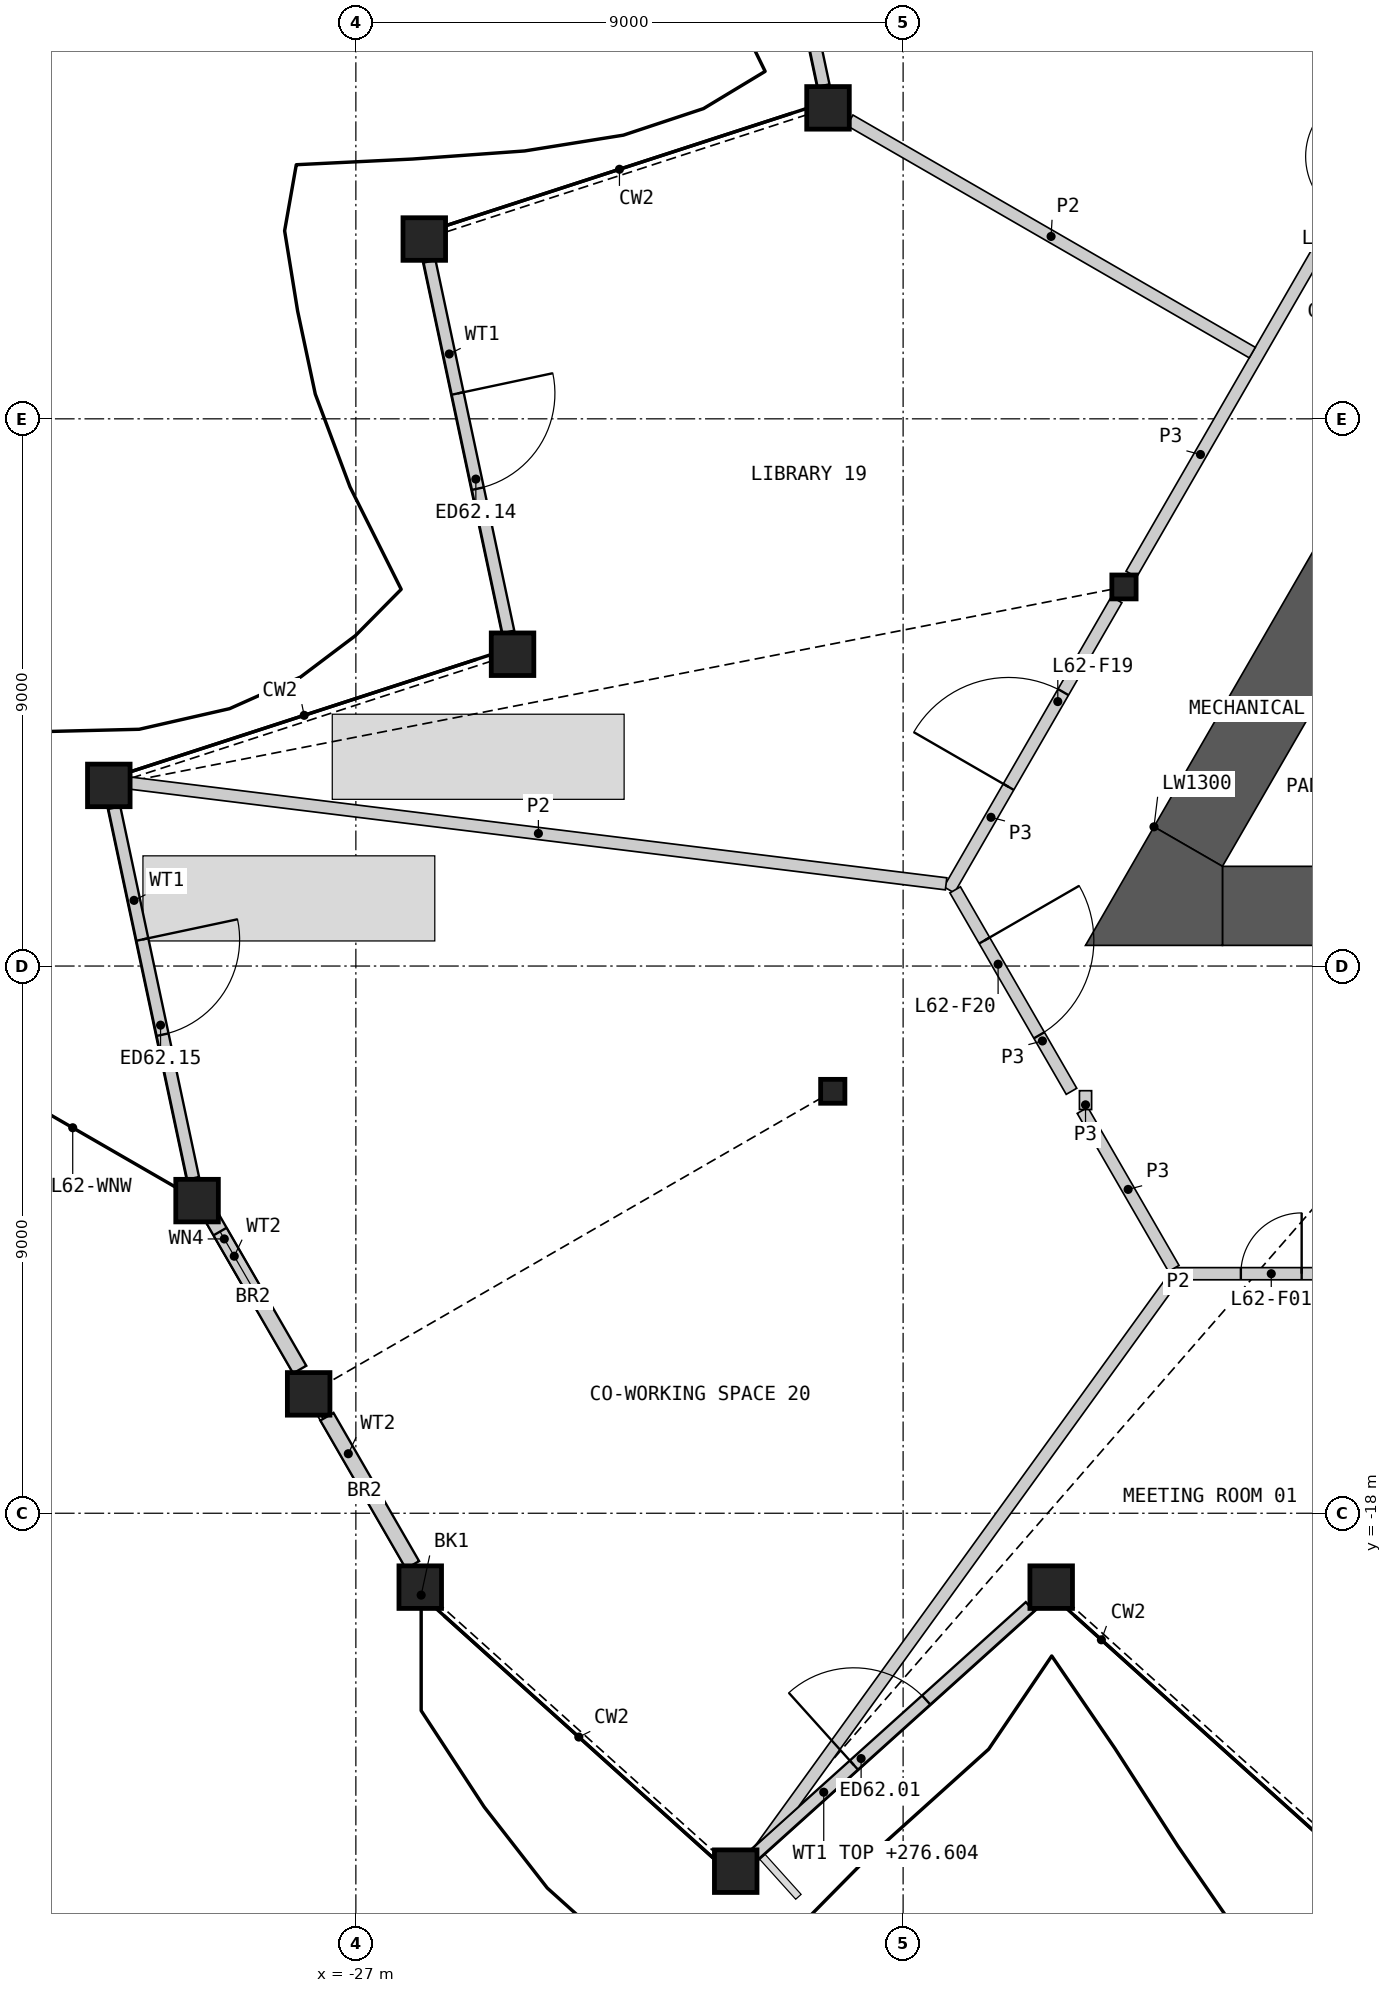
"""IFC4 building model, lengths in metres.
Left out: names, types, materials, properties, quantities, classifications, styles, units other than length and angle.
Written with IfcOpenShell. Run it as: python <this file> out.ifc"""

import sys

from ifc_helpers import new_model, si_unit, direction, frame, frame_2d, origin, origin_2d, place, context, subcontext, project, spatial, polyline, rectangle, hollow_rectangle, i_section, outline, extrude, element, fill, save


model = new_model("IFC4")
c1 = context("Model", 3, precision=1e-05, world=origin(), true_north=direction((0.0, 1.0)))
c2 = subcontext(c1, "Body", "Model", "MODEL_VIEW")
j1 = project(units=[si_unit("LENGTHUNIT", "METRE"), si_unit("PLANEANGLEUNIT", "RADIAN")], contexts=[c1])
p1 = place(None, origin())
s1 = spatial("IfcSite", under=j1, at=p1, CompositionType="ELEMENT")
p2 = place(p1, origin())
s2 = spatial("IfcBuilding", under=s1, at=p2, CompositionType="ELEMENT")
p3 = place(p2, frame((0.0, 0.0, 274.2)))
s3 = spatial("IfcBuildingStorey", under=s2, at=p3, CompositionType="ELEMENT", Elevation=274.2)
for number, where, z_axis, x_axis in (
    (1, (-25.941, -19.215, 0.0), (0.0, 0.0, 1.0), (1.0, 0.0, 0.0)),
    (2, (-20.753, -23.887, 0.0), (0.0, 0.0, 1.0), (1.0, 0.0, 0.0)),
    (3, (-15.565, -19.215, 0.0), (0.0, 0.0, 1.0), (1.0, 0.0, 0.0)),
    (4, (-19.235, 5.115, 0.0), (0.0, 0.0, 1.0), (1.0, 0.0, 0.0)),
    (5, (-25.875, 2.957, 0.0), (0.0, 0.0, 1.0), (1.0, 0.0, 0.0)),
    (6, (-24.423, -3.872, 0.0), (0.0, 0.0, 1.0), (1.0, 0.0, 0.0)),
    (7, (-31.063, -6.029, 0.0), (0.0, 0.0, 1.0), (1.0, 0.0, 0.0)),
    (8, (-29.612, -12.858, 0.0), (0.0, 0.0, 1.0), (1.0, 0.0, 0.0)),
    (9, (-27.776, -16.037, 0.0), (0.0, 0.0, 1.0), (1.0, 0.0, 0.0)),
):
    element("IfcColumn", number, at=place(p3, frame(where, z_axis=z_axis, x_axis=x_axis)), inside=s3, PredefinedType="COLUMN", context=c2, shape_type="SweptSolid", body=[
        extrude(hollow_rectangle(XDim=0.7, YDim=0.7, WallThickness=0.045, at=origin_2d()), origin(), (0.0, 0.0, 1.0), 3.6),
    ])
for number, where, z_axis, x_axis in (
    (10, (-14.368, -2.765, 0.0), (0.0, 0.0, 1.0), (1.0, 0.0, 0.0)),
    (11, (-19.157, -11.06, 0.0), (0.0, 0.0, 1.0), (1.0, 0.0, 0.0)),
):
    element("IfcColumn", number, at=place(p3, frame(where, z_axis=z_axis, x_axis=x_axis)), inside=s3, PredefinedType="COLUMN", context=c2, shape_type="SweptSolid", body=[
        extrude(i_section(OverallWidth=0.399, OverallDepth=0.393, WebThickness=0.023, FlangeThickness=0.037, at=origin_2d()), origin(), (0.0, 0.0, 1.0), 3.6),
    ])
p4 = place(p3, frame((-20.436, -23.606, 0.0), z_axis=(0.0, 0.0, 1.0), x_axis=(0.743162414049, 0.669111071755, 0.0)))
e12 = element("IfcWall", 12, at=p4, inside=s3, PredefinedType="SOLIDWALL", context=c2, shape_type="SweptSolid", body=[
    extrude(rectangle(XDim=6.083, YDim=0.2, at=frame_2d((3.042, 0.0))), origin(), (0.0, 0.0, 1.0), 2.404),
])
p5 = place(p4, frame((2.188, 0.0, 0.0)))
e13 = element("IfcOpeningElement", 13, at=p5, cuts=e12, PredefinedType="OPENING", context=c2, shape_type="SweptSolid", body=[
    extrude(rectangle(XDim=1.6, YDim=2.4, at=frame_2d((0.8, 1.2))), frame((0.0, 0.11, 0.0), z_axis=(0.0, -1.0, 0.0), x_axis=(1.0, 0.0, 0.0)), (0.0, 0.0, 1.0), 0.22),
])
p6 = place(p3, frame((-20.604, 11.577, 0.0), z_axis=(0.0, 0.0, 1.0), x_axis=(0.207907484076, -0.978148494895, 0.0)))
e14 = element("IfcWall", 14, at=p6, inside=s3, PredefinedType="SOLIDWALL", context=c2, shape_type="SweptSolid", body=[
    extrude(rectangle(XDim=6.232, YDim=0.2, at=frame_2d((3.116, 0.0))), origin(), (0.0, 0.0, 1.0), 2.701),
])
p7 = place(p6, frame((2.227, 0.0, 0.0)))
e15 = element("IfcOpeningElement", 15, at=p7, cuts=e14, PredefinedType="OPENING", context=c2, shape_type="SweptSolid", body=[
    extrude(rectangle(XDim=1.6, YDim=2.4, at=frame_2d((0.8, 1.2))), frame((0.0, 0.11, 0.0), z_axis=(0.0, -1.0, 0.0), x_axis=(1.0, 0.0, 0.0)), (0.0, 0.0, 1.0), 0.22),
])
p8 = place(p3, frame((-25.788, 2.591, 0.0), z_axis=(0.0, 0.0, 1.0), x_axis=(0.207907484076, -0.978148494895, 0.0)))
e16 = element("IfcWall", 16, at=p8, inside=s3, PredefinedType="SOLIDWALL", context=c2, shape_type="SweptSolid", body=[
    extrude(rectangle(XDim=6.232, YDim=0.2, at=frame_2d((3.116, 0.0))), origin(), (0.0, 0.0, 1.0), 2.701),
])
p9 = place(p8, frame((2.222, 0.0, 0.0)))
e17 = element("IfcOpeningElement", 17, at=p9, cuts=e16, PredefinedType="OPENING", context=c2, shape_type="SweptSolid", body=[
    extrude(rectangle(XDim=1.6, YDim=2.4, at=frame_2d((0.8, 1.2))), frame((0.0, 0.11, 0.0), z_axis=(0.0, -1.0, 0.0), x_axis=(1.0, 0.0, 0.0)), (0.0, 0.0, 1.0), 0.22),
])
p10 = place(p3, frame((-30.972, -6.396, 0.0), z_axis=(0.0, 0.0, 1.0), x_axis=(0.207907484076, -0.978148494895, 0.0)))
e18 = element("IfcWall", 18, at=p10, inside=s3, PredefinedType="SOLIDWALL", context=c2, shape_type="SweptSolid", body=[
    extrude(rectangle(XDim=6.232, YDim=0.2, at=frame_2d((3.116, 0.0))), origin(), (0.0, 0.0, 1.0), 2.701),
])
p11 = place(p10, frame((2.216, 0.0, 0.0)))
e19 = element("IfcOpeningElement", 19, at=p11, cuts=e18, PredefinedType="OPENING", context=c2, shape_type="SweptSolid", body=[
    extrude(rectangle(XDim=1.6, YDim=2.4, at=frame_2d((0.8, 1.2))), frame((0.0, 0.11, 0.0), z_axis=(0.0, -1.0, 0.0), x_axis=(1.0, 0.0, 0.0)), (0.0, 0.0, 1.0), 0.22),
])
p12 = place(p3, frame((-29.359, -13.151, 0.0), z_axis=(0.0, 0.0, 1.0), x_axis=(0.499989935246, -0.866031214595, 0.0)))
e20 = element("IfcWall", 20, at=p12, inside=s3, PredefinedType="SOLIDWALL", context=c2, shape_type="SweptSolid", body=[
    extrude(rectangle(XDim=2.871, YDim=0.25, at=frame_2d((1.435, 0.0))), origin(), (0.0, 0.0, 1.0), 2.701),
])
p13 = place(p12, frame((0.25, 0.0, 1.8)))
e21 = element("IfcOpeningElement", 21, at=p13, cuts=e20, PredefinedType="OPENING", context=c2, shape_type="SweptSolid", body=[
    extrude(rectangle(XDim=1.4, YDim=0.7, at=frame_2d((0.7, 0.35))), frame((0.0, 0.135, 0.0), z_axis=(0.0, -1.0, 0.0), x_axis=(1.0, 0.0, 0.0)), (0.0, 0.0, 1.0), 0.27),
])
p14 = place(p3, frame((-27.476, -16.412, 0.0), z_axis=(0.0, 0.0, 1.0), x_axis=(0.49996263964, -0.866046972724, 0.0)))
e22 = element("IfcWall", 22, at=p14, inside=s3, PredefinedType="SOLIDWALL", context=c2, shape_type="SweptSolid", body=[
    extrude(rectangle(XDim=2.816, YDim=0.25, at=frame_2d((1.408, 0.0))), origin(), (0.0, 0.0, 1.0), 2.701),
])
p15 = place(p3, frame((-12.748, -8.01, 0.0), z_axis=(0.0, 0.0, 1.0), x_axis=(1.0, 0.0, 0.0)))
e23 = element("IfcWall", 23, at=p15, inside=s3, PredefinedType="SHEAR", context=c2, shape_type="SweptSolid", body=[
    extrude(rectangle(XDim=4.26, YDim=1.3, at=frame_2d((2.13, 0.0))), origin(), (0.0, 0.0, 1.0), 3.25),
])
p16 = place(p3, frame((-10.338, -1.885, 0.0), z_axis=(0.0, 0.0, 1.0), x_axis=(-0.499975944838, -0.866039291593, 0.0)))
e24 = element("IfcWall", 24, at=p16, inside=s3, PredefinedType="SHEAR", context=c2, shape_type="SweptSolid", body=[
    extrude(rectangle(XDim=5.947, YDim=1.3, at=frame_2d((2.974, 0.0))), origin(), (0.0, 0.0, 1.0), 3.25),
])
p17 = place(p3, origin())
e25 = element("IfcWall", 25, at=p17, inside=s3, PredefinedType="SHEAR", context=c2, shape_type="SweptSolid", body=[
    extrude(outline(polyline([(-13.874, -6.71), (-12.748, -7.36), (-12.748, -8.66), (-15.0, -8.66), (-13.874, -6.71)])), origin(), (0.0, 0.0, 1.0), 3.25),
])
p18 = place(p3, frame((-13.599, -14.06, 0.0), z_axis=(0.0, 0.0, 1.0), x_axis=(1.0, 0.0, 0.0)))
e26 = element("IfcWall", 26, at=p18, inside=s3, PredefinedType="PARTITIONING", context=c2, shape_type="SweptSolid", body=[
    extrude(rectangle(XDim=27.198, YDim=0.2, at=frame_2d((13.599, 0.0))), origin(), (0.0, 0.0, 1.0), 3.25),
])
p19 = place(p18, frame((1.153, 0.0, 0.0)))
e27 = element("IfcOpeningElement", 27, at=p19, cuts=e26, PredefinedType="OPENING", context=c2, shape_type="SweptSolid", body=[
    extrude(rectangle(XDim=1.0, YDim=2.1, at=frame_2d((0.5, 1.05))), frame((0.0, 0.11, 0.0), z_axis=(0.0, -1.0, 0.0), x_axis=(1.0, 0.0, 0.0)), (0.0, 0.0, 1.0), 0.22),
])
p20 = place(p18, frame((7.478, 0.0, 0.0)))
e28 = element("IfcOpeningElement", 28, at=p20, cuts=e26, PredefinedType="OPENING", context=c2, shape_type="SweptSolid", body=[
    extrude(rectangle(XDim=1.8, YDim=2.1, at=frame_2d((0.9, 1.05))), frame((0.0, 0.11, 0.0), z_axis=(0.0, -1.0, 0.0), x_axis=(1.0, 0.0, 0.0)), (0.0, 0.0, 1.0), 0.22),
])
p21 = place(p18, frame((17.516, 0.0, 0.0)))
e29 = element("IfcOpeningElement", 29, at=p21, cuts=e26, PredefinedType="OPENING", context=c2, shape_type="SweptSolid", body=[
    extrude(rectangle(XDim=1.0, YDim=2.1, at=frame_2d((0.5, 1.05))), frame((0.0, 0.11, 0.0), z_axis=(0.0, -1.0, 0.0), x_axis=(1.0, 0.0, 0.0)), (0.0, 0.0, 1.0), 0.22),
])
p22 = place(p18, frame((22.036, 0.0, 0.0)))
e30 = element("IfcOpeningElement", 30, at=p22, cuts=e26, PredefinedType="OPENING", context=c2, shape_type="SweptSolid", body=[
    extrude(rectangle(XDim=1.8, YDim=2.1, at=frame_2d((0.9, 1.05))), frame((0.0, 0.11, 0.0), z_axis=(0.0, -1.0, 0.0), x_axis=(1.0, 0.0, 0.0)), (0.0, 0.0, 1.0), 0.22),
])
p23 = place(p3, frame((-14.247, -2.556, 0.0), z_axis=(0.0, 0.0, 1.0), x_axis=(0.49998193945, 0.866035830797, 0.0)))
e31 = element("IfcWall", 31, at=p23, inside=s3, PredefinedType="PARTITIONING", context=c2, shape_type="SweptSolid", body=[
    extrude(rectangle(XDim=9.094, YDim=0.2, at=frame_2d((4.547, 0.0))), origin(), (0.0, 0.0, 1.0), 3.25),
])
p24 = place(p23, frame((6.833, 0.0, 0.0)))
e32 = element("IfcOpeningElement", 32, at=p24, cuts=e31, PredefinedType="OPENING", context=c2, shape_type="SweptSolid", body=[
    extrude(rectangle(XDim=1.1, YDim=2.1, at=frame_2d((0.55, 1.05))), frame((0.0, 0.11, 0.0), z_axis=(0.0, -1.0, 0.0), x_axis=(1.0, 0.0, 0.0)), (0.0, 0.0, 1.0), 0.22),
])
p25 = place(p3, frame((-17.244, -7.747, 0.0), z_axis=(0.0, 0.0, 1.0), x_axis=(0.500017753321, 0.866015153657, 0.0)))
e33 = element("IfcWall", 33, at=p25, inside=s3, PredefinedType="PARTITIONING", context=c2, shape_type="SweptSolid", body=[
    extrude(rectangle(XDim=5.51, YDim=0.2, at=frame_2d((2.755, 0.0))), origin(), (0.0, 0.0, 1.0), 3.25),
])
p26 = place(p25, frame((1.956, 0.0, 0.0)))
e34 = element("IfcOpeningElement", 34, at=p26, cuts=e33, PredefinedType="OPENING", context=c2, shape_type="SweptSolid", body=[
    extrude(rectangle(XDim=1.8, YDim=2.1, at=frame_2d((0.9, 1.05))), frame((0.0, 0.11, 0.0), z_axis=(0.0, -1.0, 0.0), x_axis=(1.0, 0.0, 0.0)), (0.0, 0.0, 1.0), 0.22),
])
p27 = place(p3, frame((-17.144, -7.747, 0.0), z_axis=(0.0, 0.0, 1.0), x_axis=(0.499961815444, -0.866047448526, 0.0)))
e35 = element("IfcWall", 35, at=p27, inside=s3, PredefinedType="PARTITIONING", context=c2, shape_type="SweptSolid", body=[
    extrude(rectangle(XDim=3.826, YDim=0.2, at=frame_2d((1.913, 0.0))), origin(), (0.0, 0.0, 1.0), 3.25),
])
p28 = place(p27, frame((0.962, 0.0, 0.0)))
e36 = element("IfcOpeningElement", 36, at=p28, cuts=e35, PredefinedType="OPENING", context=c2, shape_type="SweptSolid", body=[
    extrude(rectangle(XDim=1.8, YDim=2.1, at=frame_2d((0.9, 1.05))), frame((0.0, 0.11, 0.0), z_axis=(0.0, -1.0, 0.0), x_axis=(1.0, 0.0, 0.0)), (0.0, 0.0, 1.0), 0.22),
])
p29 = place(p3, frame((-15.05, -11.374, 0.0), z_axis=(0.0, 0.0, 1.0), x_axis=(0.500048608389, -0.865997337899, 0.0)))
e37 = element("IfcWall", 37, at=p29, inside=s3, PredefinedType="PARTITIONING", context=c2, shape_type="SweptSolid", body=[
    extrude(rectangle(XDim=3.002, YDim=0.2, at=frame_2d((1.501, 0.0))), origin(), (0.0, 0.0, 1.0), 3.25),
])
p30 = place(p3, frame((-15.0, -11.36, 0.0), z_axis=(0.0, 0.0, 1.0), x_axis=(0.0, 1.0, 0.0)))
e38 = element("IfcWall", 38, at=p30, inside=s3, PredefinedType="PARTITIONING", context=c2, shape_type="SweptSolid", body=[
    extrude(rectangle(XDim=0.31, YDim=0.2, at=frame_2d((0.155, 0.0))), origin(), (0.0, 0.0, 1.0), 3.25),
])
p31 = place(p3, frame((-30.703, -5.992, 0.0), z_axis=(0.0, 0.0, 1.0), x_axis=(0.992463280008, -0.122542391993, 0.0)))
e39 = element("IfcWall", 39, at=p31, inside=s3, PredefinedType="PARTITIONING", context=c2, shape_type="SweptSolid", body=[
    extrude(rectangle(XDim=13.512, YDim=0.2, at=frame_2d((6.756, 0.0))), origin(), (0.0, 0.0, 1.0), 2.404),
])
p32 = place(p3, origin())
e40 = element("IfcWall", 40, at=p32, inside=s3, PredefinedType="PARTITIONING", context=c2, shape_type="SweptSolid", body=[
    extrude(outline(polyline([(-13.476, -14.2), (-19.723, -22.83), (-20.432, -23.468), (-13.638, -14.083), (-13.476, -14.2)])), origin(), (0.0, 0.0, 1.0), 2.404),
])
p33 = place(p3, frame((-18.875, 4.91, 0.0), z_axis=(0.0, 0.0, 1.0), x_axis=(0.866018509426, -0.50001194119, 0.0)))
e41 = element("IfcWall", 41, at=p33, inside=s3, PredefinedType="PARTITIONING", context=c2, shape_type="SweptSolid", body=[
    extrude(rectangle(XDim=7.641, YDim=0.2, at=frame_2d((3.82, 0.0))), origin(), (0.0, 0.0, 1.0), 2.404),
])
p34 = place(p5, origin())
e42 = element("IfcDoor", 42, at=p34, inside=s3, OperationType="DOUBLE_DOOR_SINGLE_SWING", PredefinedType="DOOR", context=c2, shape_type="SweptSolid", body=[
    extrude(rectangle(XDim=1.6, YDim=2.4, at=frame_2d((0.8, 1.2))), frame((0.0, 0.025, 0.0), z_axis=(0.0, -1.0, 0.0), x_axis=(1.0, 0.0, 0.0)), (0.0, 0.0, 1.0), 0.05),
])
fill(e13, e42)
p35 = place(p9, origin())
e43 = element("IfcDoor", 43, at=p35, inside=s3, OperationType="DOUBLE_DOOR_SINGLE_SWING", PredefinedType="DOOR", context=c2, shape_type="SweptSolid", body=[
    extrude(rectangle(XDim=1.6, YDim=2.4, at=frame_2d((0.8, 1.2))), frame((0.0, 0.025, 0.0), z_axis=(0.0, -1.0, 0.0), x_axis=(1.0, 0.0, 0.0)), (0.0, 0.0, 1.0), 0.05),
])
fill(e17, e43)
p36 = place(p11, origin())
e44 = element("IfcDoor", 44, at=p36, inside=s3, OperationType="DOUBLE_DOOR_SINGLE_SWING", PredefinedType="DOOR", context=c2, shape_type="SweptSolid", body=[
    extrude(rectangle(XDim=1.6, YDim=2.4, at=frame_2d((0.8, 1.2))), frame((0.0, 0.025, 0.0), z_axis=(0.0, -1.0, 0.0), x_axis=(1.0, 0.0, 0.0)), (0.0, 0.0, 1.0), 0.05),
])
fill(e19, e44)
p37 = place(p13, origin())
e45 = element("IfcWindow", 45, at=p37, inside=s3, PartitioningType="SINGLE_PANEL", PredefinedType="WINDOW", context=c2, shape_type="SweptSolid", body=[
    extrude(rectangle(XDim=1.4, YDim=0.7, at=frame_2d((0.7, 0.35))), frame((0.0, 0.03, 0.0), z_axis=(0.0, -1.0, 0.0), x_axis=(1.0, 0.0, 0.0)), (0.0, 0.0, 1.0), 0.06),
])
fill(e21, e45)
p38 = place(p19, origin())
e46 = element("IfcDoor", 46, at=p38, inside=s3, OperationType="SINGLE_SWING_RIGHT", PredefinedType="DOOR", context=c2, shape_type="SweptSolid", body=[
    extrude(rectangle(XDim=1.0, YDim=2.1, at=frame_2d((0.5, 1.05))), frame((0.0, 0.025, 0.0), z_axis=(0.0, -1.0, 0.0), x_axis=(1.0, 0.0, 0.0)), (0.0, 0.0, 1.0), 0.05),
])
fill(e27, e46)
p39 = place(p26, origin())
e47 = element("IfcDoor", 47, at=p39, inside=s3, OperationType="DOUBLE_DOOR_SINGLE_SWING", PredefinedType="DOOR", context=c2, shape_type="SweptSolid", body=[
    extrude(rectangle(XDim=1.8, YDim=2.1, at=frame_2d((0.9, 1.05))), frame((0.0, 0.025, 0.0), z_axis=(0.0, -1.0, 0.0), x_axis=(1.0, 0.0, 0.0)), (0.0, 0.0, 1.0), 0.05),
])
fill(e34, e47)
p40 = place(p28, origin())
e48 = element("IfcDoor", 48, at=p40, inside=s3, OperationType="DOUBLE_DOOR_SINGLE_SWING", PredefinedType="DOOR", context=c2, shape_type="SweptSolid", body=[
    extrude(rectangle(XDim=1.8, YDim=2.1, at=frame_2d((0.9, 1.05))), frame((0.0, 0.025, 0.0), z_axis=(0.0, -1.0, 0.0), x_axis=(1.0, 0.0, 0.0)), (0.0, 0.0, 1.0), 0.05),
])
fill(e36, e48)
save(model, sys.argv[1])
